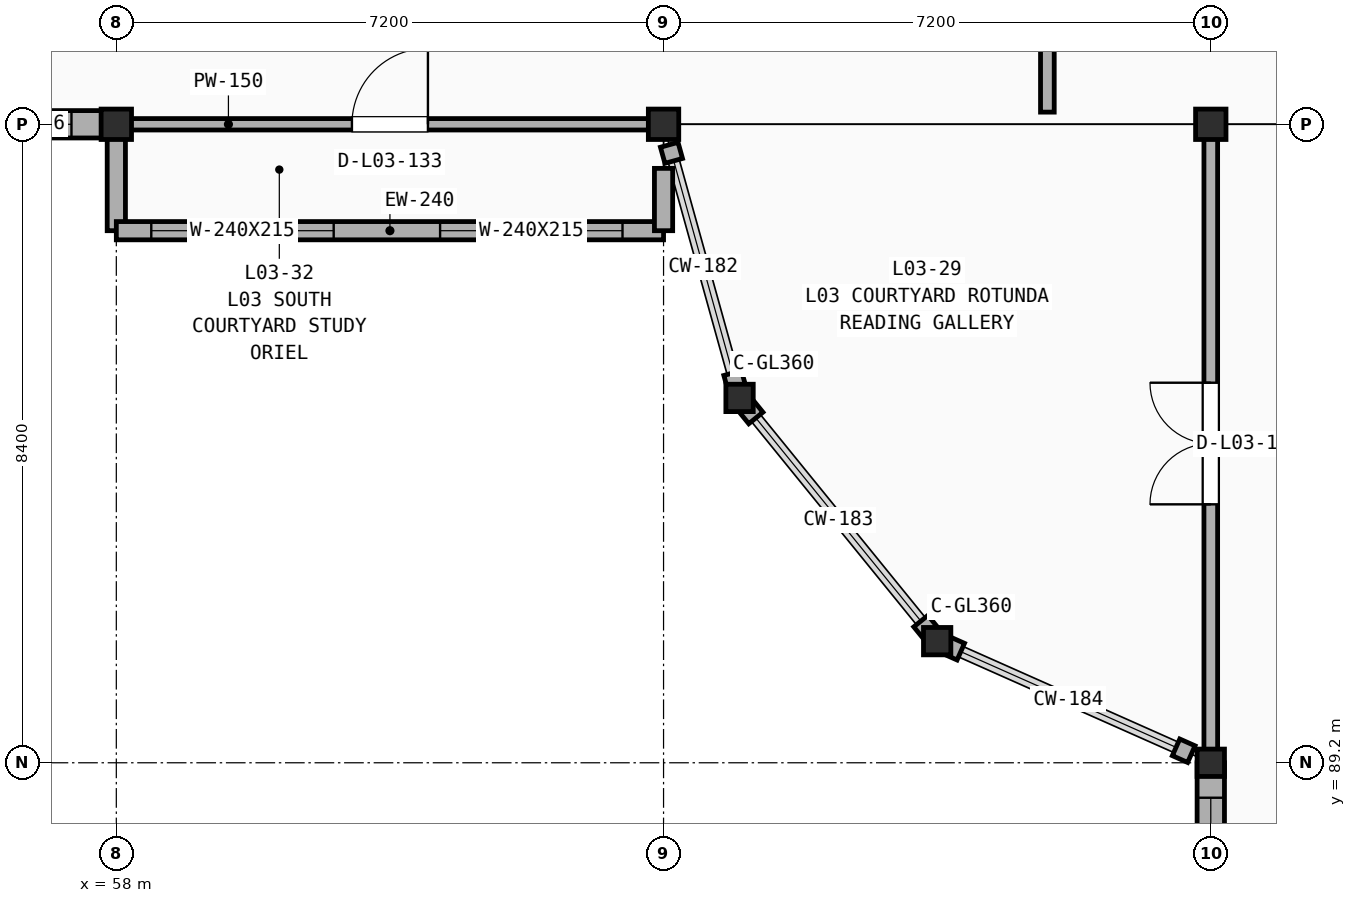
"""IFC4 building model, lengths in metres.
Left out: names, types, materials, properties, quantities, classifications, styles, units other than length and angle.
Written with IfcOpenShell. Run it as: python <this file> out.ifc"""

import sys

from ifc_helpers import new_model, si_unit, direction, frame, frame_2d, origin, origin_2d, place, context, subcontext, project, spatial, rectangle, extrude, element, fill, save


model = new_model("IFC4")
c1 = context("Model", 3, precision=1e-05, world=origin(), true_north=direction((0.0, 1.0)))
c2 = subcontext(c1, "Body", "Model", "MODEL_VIEW")
j1 = project(units=[si_unit("LENGTHUNIT", "METRE"), si_unit("PLANEANGLEUNIT", "RADIAN")], contexts=[c1])
p1 = place(None, origin())
s1 = spatial("IfcSite", under=j1, at=p1, CompositionType="ELEMENT")
p2 = place(p1, origin())
s2 = spatial("IfcBuilding", under=s1, at=p2, CompositionType="ELEMENT")
p3 = place(p2, frame((0.0, 0.0, 13.8)))
s3 = spatial("IfcBuildingStorey", under=s2, at=p3, CompositionType="ELEMENT", Elevation=13.8)
for number, where, z_axis, x_axis in (
    (1, (58.0, 97.6, 0.0), (0.0, 0.0, 1.0), (1.0, 0.0, 0.0)),
    (2, (65.2, 97.6, 0.0), (0.0, 0.0, 1.0), (1.0, 0.0, 0.0)),
):
    element("IfcColumn", number, at=place(p3, frame(where, z_axis=z_axis, x_axis=x_axis)), inside=s3, PredefinedType="COLUMN", context=c2, shape_type="SweptSolid", body=[
        extrude(rectangle(XDim=0.4, YDim=0.4, at=origin_2d()), origin(), (0.0, 0.0, 1.0), 3.9),
    ])
for number, where, z_axis, x_axis in (
    (3, (66.2, 94.0, 0.0), (0.0, 0.0, 1.0), (1.0, 0.0, 0.0)),
    (4, (68.8, 90.8, 0.0), (0.0, 0.0, 1.0), (1.0, 0.0, 0.0)),
    (5, (72.4, 89.2, 0.0), (0.0, 0.0, 1.0), (1.0, 0.0, 0.0)),
):
    element("IfcColumn", number, at=place(p3, frame(where, z_axis=z_axis, x_axis=x_axis)), inside=s3, PredefinedType="COLUMN", context=c2, shape_type="SweptSolid", body=[
        extrude(rectangle(XDim=0.36, YDim=0.36, at=origin_2d()), origin(), (0.0, 0.0, 1.0), 3.9),
    ])
p4 = place(p3, frame((72.4, 97.6, 0.0), z_axis=(0.0, 0.0, 1.0), x_axis=(1.0, 0.0, 0.0)))
e6 = element("IfcColumn", 6, at=p4, inside=s3, PredefinedType="COLUMN", context=c2, shape_type="SweptSolid", body=[
    extrude(rectangle(XDim=0.4, YDim=0.4, at=origin_2d()), origin(), (0.0, 0.0, 1.0), 3.9),
])
p5 = place(p3, frame((58.0, 97.6, 0.0), z_axis=(0.0, 0.0, 1.0), x_axis=(1.0, 0.0, 0.0)))
e7 = element("IfcWall", 7, at=p5, inside=s3, PredefinedType="PARTITIONING", context=c2, shape_type="SweptSolid", body=[
    extrude(rectangle(XDim=7.2, YDim=0.15, at=frame_2d((3.6, 0.0))), origin(), (0.0, 0.0, 1.0), 3.15),
])
p6 = place(p5, frame((3.1, 0.0, -0.01)))
e8 = element("IfcOpeningElement", 8, at=p6, cuts=e7, PredefinedType="OPENING", context=c2, shape_type="SweptSolid", body=[
    extrude(rectangle(XDim=1.0, YDim=2.16, at=frame_2d((0.5, 1.08))), frame((0.0, 0.085, 0.0), z_axis=(0.0, -1.0, 0.0), x_axis=(1.0, 0.0, 0.0)), (0.0, 0.0, 1.0), 0.17),
])
p7 = place(p3, frame((70.25, 97.76, 0.0), z_axis=(0.0, 0.0, 1.0), x_axis=(0.0, 1.0, 0.0)))
e9 = element("IfcWall", 9, at=p7, inside=s3, PredefinedType="PARTITIONING", context=c2, shape_type="SweptSolid", body=[
    extrude(rectangle(XDim=4.19, YDim=0.18, at=frame_2d((2.095, 0.0))), origin(), (0.0, 0.0, 1.0), 3.54),
])
p8 = place(p3, frame((72.4, 89.2, 0.0), z_axis=(0.0, 0.0, 1.0), x_axis=(0.0, 1.0, 0.0)))
e10 = element("IfcWall", 10, at=p8, inside=s3, PredefinedType="PARTITIONING", context=c2, shape_type="SweptSolid", body=[
    extrude(rectangle(XDim=8.4, YDim=0.18, at=frame_2d((4.2, 0.0))), origin(), (0.0, 0.0, 1.0), 3.15),
])
p9 = place(p8, frame((3.4, 0.0, -0.01)))
e11 = element("IfcOpeningElement", 11, at=p9, cuts=e10, PredefinedType="OPENING", context=c2, shape_type="SweptSolid", body=[
    extrude(rectangle(XDim=1.6, YDim=2.21, at=frame_2d((0.8, 1.105))), frame((0.0, 0.1, 0.0), z_axis=(0.0, -1.0, 0.0), x_axis=(1.0, 0.0, 0.0)), (0.0, 0.0, 1.0), 0.2),
])
p10 = place(p3, frame((50.8, 97.6, 0.0), z_axis=(0.0, 0.0, 1.0), x_axis=(1.0, 0.0, 0.0)))
e12 = element("IfcWall", 12, at=p10, inside=s3, PredefinedType="SOLIDWALL", context=c2, shape_type="SweptSolid", body=[
    extrude(rectangle(XDim=7.2, YDim=0.36, at=frame_2d((3.6, 0.0))), origin(), (0.0, 0.0, 1.0), 3.15),
])
p11 = place(p10, frame((0.46, 0.0, 0.75)))
e13 = element("IfcOpeningElement", 13, at=p11, cuts=e12, PredefinedType="OPENING", context=c2, shape_type="SweptSolid", body=[
    extrude(rectangle(XDim=1.55, YDim=2.26, at=frame_2d((0.775, 1.13))), frame((0.0, 0.19, 0.0), z_axis=(0.0, -1.0, 0.0), x_axis=(1.0, 0.0, 0.0)), (0.0, 0.0, 1.0), 0.38),
])
p12 = place(p10, frame((5.06, 0.0, 0.75)))
e14 = element("IfcOpeningElement", 14, at=p12, cuts=e12, PredefinedType="OPENING", context=c2, shape_type="SweptSolid", body=[
    extrude(rectangle(XDim=1.55, YDim=2.26, at=frame_2d((0.775, 1.13))), frame((0.0, 0.19, 0.0), z_axis=(0.0, -1.0, 0.0), x_axis=(1.0, 0.0, 0.0)), (0.0, 0.0, 1.0), 0.38),
])
p13 = place(p3, frame((72.4, 89.2, 0.0), z_axis=(0.0, 0.0, 1.0), x_axis=(0.0, -1.0, 0.0)))
e15 = element("IfcWall", 15, at=p13, inside=s3, PredefinedType="SOLIDWALL", context=c2, shape_type="SweptSolid", body=[
    extrude(rectangle(XDim=8.4, YDim=0.36, at=frame_2d((4.2, 0.0))), origin(), (0.0, 0.0, 1.0), 3.2),
])
p14 = place(p13, frame((0.46, 0.0, 0.75)))
e16 = element("IfcOpeningElement", 16, at=p14, cuts=e15, PredefinedType="OPENING", context=c2, shape_type="SweptSolid", body=[
    extrude(rectangle(XDim=1.55, YDim=2.31, at=frame_2d((0.775, 1.155))), frame((0.0, 0.19, 0.0), z_axis=(0.0, -1.0, 0.0), x_axis=(1.0, 0.0, 0.0)), (0.0, 0.0, 1.0), 0.38),
])
p15 = place(p13, frame((6.26, 0.0, 0.75)))
e17 = element("IfcOpeningElement", 17, at=p15, cuts=e15, PredefinedType="OPENING", context=c2, shape_type="SweptSolid", body=[
    extrude(rectangle(XDim=1.55, YDim=2.31, at=frame_2d((0.775, 1.155))), frame((0.0, 0.19, 0.0), z_axis=(0.0, -1.0, 0.0), x_axis=(1.0, 0.0, 0.0)), (0.0, 0.0, 1.0), 0.38),
])
p16 = place(p3, frame((65.275, 97.33, 0.0), z_axis=(0.0, 0.0, 1.0), x_axis=(0.267529355044, -0.963549710285, 0.0)))
e18 = element("IfcWall", 18, at=p16, inside=s3, PredefinedType="SOLIDWALL", context=c2, shape_type="SweptSolid", body=[
    extrude(rectangle(XDim=0.22, YDim=0.24, at=frame_2d((0.11, 0.0))), origin(), (0.0, 0.0, 1.0), 3.37),
])
for number, where, z_axis, x_axis in (
    (19, (66.109, 94.328, 0.0), (0.0, 0.0, 1.0), (0.268, -0.963, 0.0)),
    (20, (66.2, 94.0, 0.0), (0.0, 0.0, 1.0), (0.63, -0.776, 0.0)),
    (21, (68.586, 91.064, 0.0), (0.0, 0.0, 1.0), (0.63, -0.776, 0.0)),
):
    element("IfcWall", number, at=place(p3, frame(where, z_axis=z_axis, x_axis=x_axis)), inside=s3, PredefinedType="SOLIDWALL", context=c2, shape_type="SweptSolid", body=[
        extrude(rectangle(XDim=0.34, YDim=0.24, at=frame_2d((0.17, 0.0))), origin(), (0.0, 0.0, 1.0), 3.37),
    ])
p17 = place(p3, frame((68.8, 90.8, 0.0), z_axis=(0.0, 0.0, 1.0), x_axis=(0.913633745955, -0.406538286329, 0.0)))
e22 = element("IfcWall", 22, at=p17, inside=s3, PredefinedType="SOLIDWALL", context=c2, shape_type="SweptSolid", body=[
    extrude(rectangle(XDim=0.34, YDim=0.24, at=frame_2d((0.17, 0.0))), origin(), (0.0, 0.0, 1.0), 3.37),
])
p18 = place(p3, frame((71.943, 89.403, 0.0), z_axis=(0.0, 0.0, 1.0), x_axis=(0.913719959968, -0.406344477944, 0.0)))
e23 = element("IfcWall", 23, at=p18, inside=s3, PredefinedType="SOLIDWALL", context=c2, shape_type="SweptSolid", body=[
    extrude(rectangle(XDim=0.22, YDim=0.24, at=frame_2d((0.11, 0.0))), origin(), (0.0, 0.0, 1.0), 3.37),
])
p19 = place(p3, frame((58.0, 97.45, 0.0), z_axis=(0.0, 0.0, 1.0), x_axis=(0.0, -1.0, 0.0)))
e24 = element("IfcWall", 24, at=p19, inside=s3, PredefinedType="SOLIDWALL", context=c2, shape_type="SweptSolid", body=[
    extrude(rectangle(XDim=1.25, YDim=0.24, at=frame_2d((0.625, 0.0))), origin(), (0.0, 0.0, 1.0), 3.15),
])
p20 = place(p3, frame((58.0, 96.2, 0.0), z_axis=(0.0, 0.0, 1.0), x_axis=(1.0, 0.0, 0.0)))
e25 = element("IfcWall", 25, at=p20, inside=s3, PredefinedType="SOLIDWALL", context=c2, shape_type="SweptSolid", body=[
    extrude(rectangle(XDim=7.2, YDim=0.24, at=frame_2d((3.6, 0.0))), origin(), (0.0, 0.0, 1.0), 3.15),
])
p21 = place(p20, frame((0.46, 0.0, 0.65)))
e26 = element("IfcOpeningElement", 26, at=p21, cuts=e25, PredefinedType="OPENING", context=c2, shape_type="SweptSolid", body=[
    extrude(rectangle(XDim=2.4, YDim=2.15, at=frame_2d((1.2, 1.075))), frame((0.0, 0.13, 0.0), z_axis=(0.0, -1.0, 0.0), x_axis=(1.0, 0.0, 0.0)), (0.0, 0.0, 1.0), 0.26),
])
p22 = place(p20, frame((4.26, 0.0, 0.65)))
e27 = element("IfcOpeningElement", 27, at=p22, cuts=e25, PredefinedType="OPENING", context=c2, shape_type="SweptSolid", body=[
    extrude(rectangle(XDim=2.4, YDim=2.15, at=frame_2d((1.2, 1.075))), frame((0.0, 0.13, 0.0), z_axis=(0.0, -1.0, 0.0), x_axis=(1.0, 0.0, 0.0)), (0.0, 0.0, 1.0), 0.26),
])
p23 = place(p3, frame((65.2, 96.2, 0.0), z_axis=(0.0, 0.0, 1.0), x_axis=(0.0, 1.0, 0.0)))
e28 = element("IfcWall", 28, at=p23, inside=s3, PredefinedType="SOLIDWALL", context=c2, shape_type="SweptSolid", body=[
    extrude(rectangle(XDim=0.82, YDim=0.24, at=frame_2d((0.41, 0.0))), origin(), (0.0, 0.0, 1.0), 3.15),
])
p24 = place(p6, frame((0.0, 0.0, 0.01)))
e29 = element("IfcDoor", 29, at=p24, inside=s3, OperationType="SINGLE_SWING_RIGHT", PredefinedType="DOOR", context=c2, shape_type="SweptSolid", body=[
    extrude(rectangle(XDim=1.0, YDim=2.15, at=frame_2d((0.5, 1.075))), frame((0.0, 0.025, 0.0), z_axis=(0.0, -1.0, 0.0), x_axis=(1.0, 0.0, 0.0)), (0.0, 0.0, 1.0), 0.05),
])
fill(e8, e29)
p25 = place(p9, frame((0.0, 0.0, 0.01)))
e30 = element("IfcDoor", 30, at=p25, inside=s3, OperationType="DOUBLE_SWING_LEFT", PredefinedType="DOOR", context=c2, shape_type="SweptSolid", body=[
    extrude(rectangle(XDim=1.6, YDim=2.2, at=frame_2d((0.8, 1.1))), frame((0.0, 0.025, 0.0), z_axis=(0.0, -1.0, 0.0), x_axis=(1.0, 0.0, 0.0)), (0.0, 0.0, 1.0), 0.05),
])
fill(e11, e30)
p26 = place(p12, origin())
e31 = element("IfcWindow", 31, at=p26, inside=s3, PartitioningType="DOUBLE_PANEL_HORIZONTAL", PredefinedType="WINDOW", context=c2, shape_type="SweptSolid", body=[
    extrude(rectangle(XDim=1.55, YDim=2.26, at=frame_2d((0.775, 1.13))), frame((0.0, 0.03, 0.0), z_axis=(0.0, -1.0, 0.0), x_axis=(1.0, 0.0, 0.0)), (0.0, 0.0, 1.0), 0.06),
])
fill(e14, e31)
p27 = place(p14, origin())
e32 = element("IfcWindow", 32, at=p27, inside=s3, PartitioningType="DOUBLE_PANEL_HORIZONTAL", PredefinedType="WINDOW", context=c2, shape_type="SweptSolid", body=[
    extrude(rectangle(XDim=1.55, YDim=2.31, at=frame_2d((0.775, 1.155))), frame((0.0, 0.03, 0.0), z_axis=(0.0, -1.0, 0.0), x_axis=(1.0, 0.0, 0.0)), (0.0, 0.0, 1.0), 0.06),
])
fill(e16, e32)
p28 = place(p21, origin())
e33 = element("IfcWindow", 33, at=p28, inside=s3, PartitioningType="TRIPLE_PANEL_VERTICAL", PredefinedType="WINDOW", context=c2, shape_type="SweptSolid", body=[
    extrude(rectangle(XDim=2.4, YDim=2.15, at=frame_2d((1.2, 1.075))), frame((0.0, 0.03, 0.0), z_axis=(0.0, -1.0, 0.0), x_axis=(1.0, 0.0, 0.0)), (0.0, 0.0, 1.0), 0.06),
])
fill(e26, e33)
p29 = place(p22, origin())
e34 = element("IfcWindow", 34, at=p29, inside=s3, PartitioningType="TRIPLE_PANEL_VERTICAL", PredefinedType="WINDOW", context=c2, shape_type="SweptSolid", body=[
    extrude(rectangle(XDim=2.4, YDim=2.15, at=frame_2d((1.2, 1.075))), frame((0.0, 0.03, 0.0), z_axis=(0.0, -1.0, 0.0), x_axis=(1.0, 0.0, 0.0)), (0.0, 0.0, 1.0), 0.06),
])
fill(e27, e34)
save(model, sys.argv[1])
